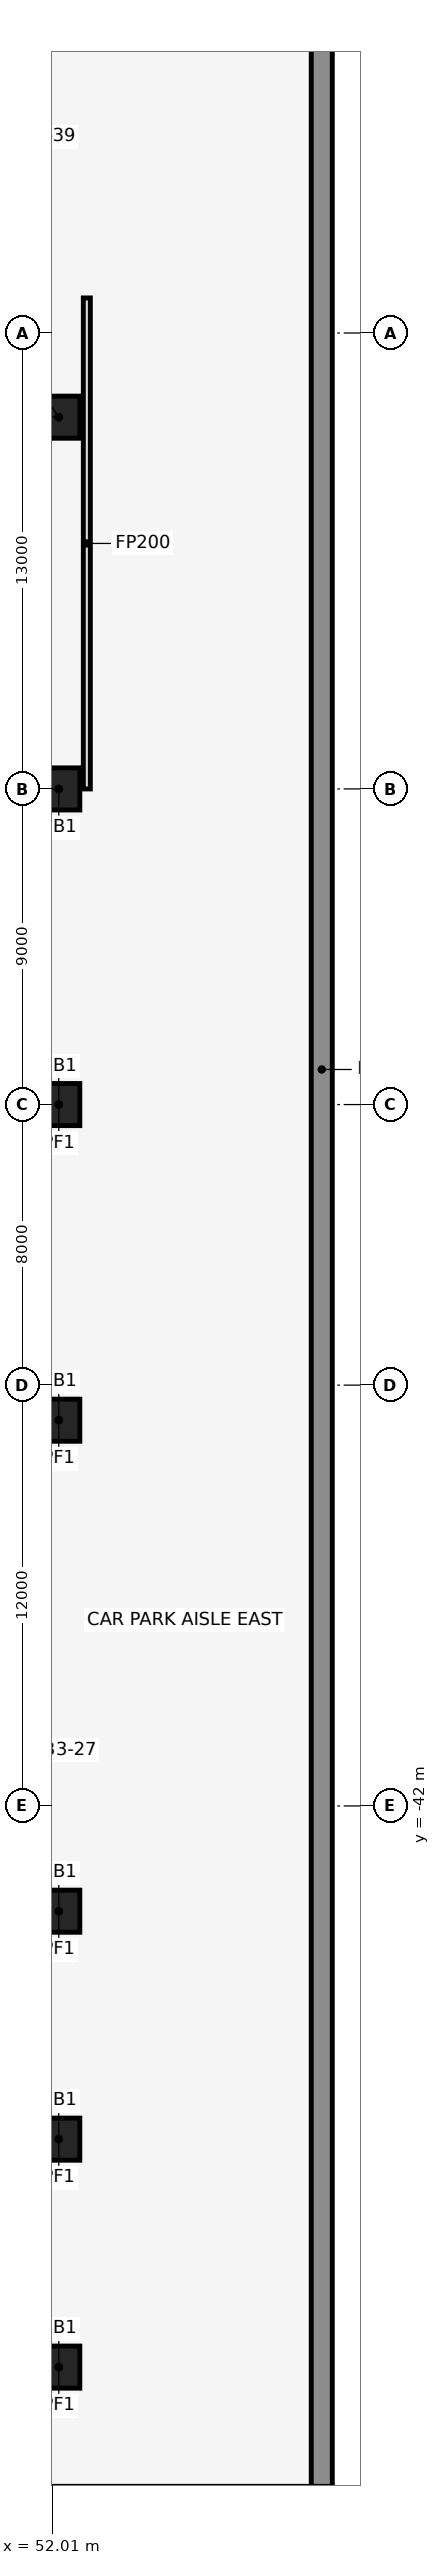
"""IFC4 building model, lengths in metres.
Left out: names, types, materials, properties, quantities, classifications, styles, units other than length and angle.
Written with IfcOpenShell. Run it as: python <this file> out.ifc"""

import sys

from ifc_helpers import new_model, si_unit, direction, frame, frame_2d, origin, origin_2d, place, context, subcontext, project, spatial, rectangle, extrude, element, save


model = new_model("IFC4")
c1 = context("Model", 3, precision=1e-05, world=origin(), true_north=direction((0.0, 1.0)))
c2 = subcontext(c1, "Body", "Model", "MODEL_VIEW")
j1 = project(units=[si_unit("LENGTHUNIT", "METRE"), si_unit("PLANEANGLEUNIT", "RADIAN")], contexts=[c1])
p1 = place(None, origin())
s1 = spatial("IfcSite", under=j1, at=p1, CompositionType="ELEMENT")
p2 = place(p1, origin())
s2 = spatial("IfcBuilding", under=s1, at=p2, CompositionType="ELEMENT")
p3 = place(p2, frame((0.0, 0.0, -15.0)))
s3 = spatial("IfcBuildingStorey", under=s2, at=p3, CompositionType="ELEMENT", Elevation=-15.0)
for number, where, z_axis, x_axis in (
    (1, (52.2, -2.4, -0.3), (0.0, 0.0, 1.0), (1.0, 0.0, 0.0)),
    (2, (52.2, -13.0, -0.3), (0.0, 0.0, 1.0), (1.0, 0.0, 0.0)),
    (3, (52.2, -22.0, -0.3), (0.0, 0.0, 1.0), (1.0, 0.0, 0.0)),
    (4, (52.2, -31.0, -0.3), (0.0, 0.0, 1.0), (1.0, 0.0, 0.0)),
    (5, (52.2, -45.0, -0.3), (0.0, 0.0, 1.0), (1.0, 0.0, 0.0)),
    (6, (52.2, -51.5, -0.3), (0.0, 0.0, 1.0), (1.0, 0.0, 0.0)),
    (7, (52.2, -58.0, -0.3), (0.0, 0.0, 1.0), (1.0, 0.0, 0.0)),
):
    element("IfcColumn", number, at=place(p3, frame(where, z_axis=z_axis, x_axis=x_axis)), inside=s3, PredefinedType="COLUMN", context=c2, shape_type="SweptSolid", body=[
        extrude(rectangle(XDim=1.2, YDim=1.2, at=origin_2d()), origin(), (0.0, 0.0, 1.0), 5.3),
    ])
p4 = place(p3, frame((59.7, -61.4, -0.3), z_axis=(0.0, 0.0, 1.0), x_axis=(0.0, 1.0, 0.0)))
e8 = element("IfcWall", 8, at=p4, inside=s3, PredefinedType="SOLIDWALL", context=c2, shape_type="SweptSolid", body=[
    extrude(rectangle(XDim=80.8, YDim=0.6, at=frame_2d((40.4, 0.0))), origin(), (0.0, 0.0, 1.0), 5.3),
])
p5 = place(p3, frame((53.0, -13.0, 0.0), z_axis=(0.0, 0.0, 1.0), x_axis=(0.0, 1.0, 0.0)))
e9 = element("IfcWall", 9, at=p5, inside=s3, PredefinedType="PARTITIONING", context=c2, shape_type="SweptSolid", body=[
    extrude(rectangle(XDim=14.0, YDim=0.2, at=frame_2d((7.0, 0.0))), origin(), (0.0, 0.0, 1.0), 4.7),
])
save(model, sys.argv[1])
